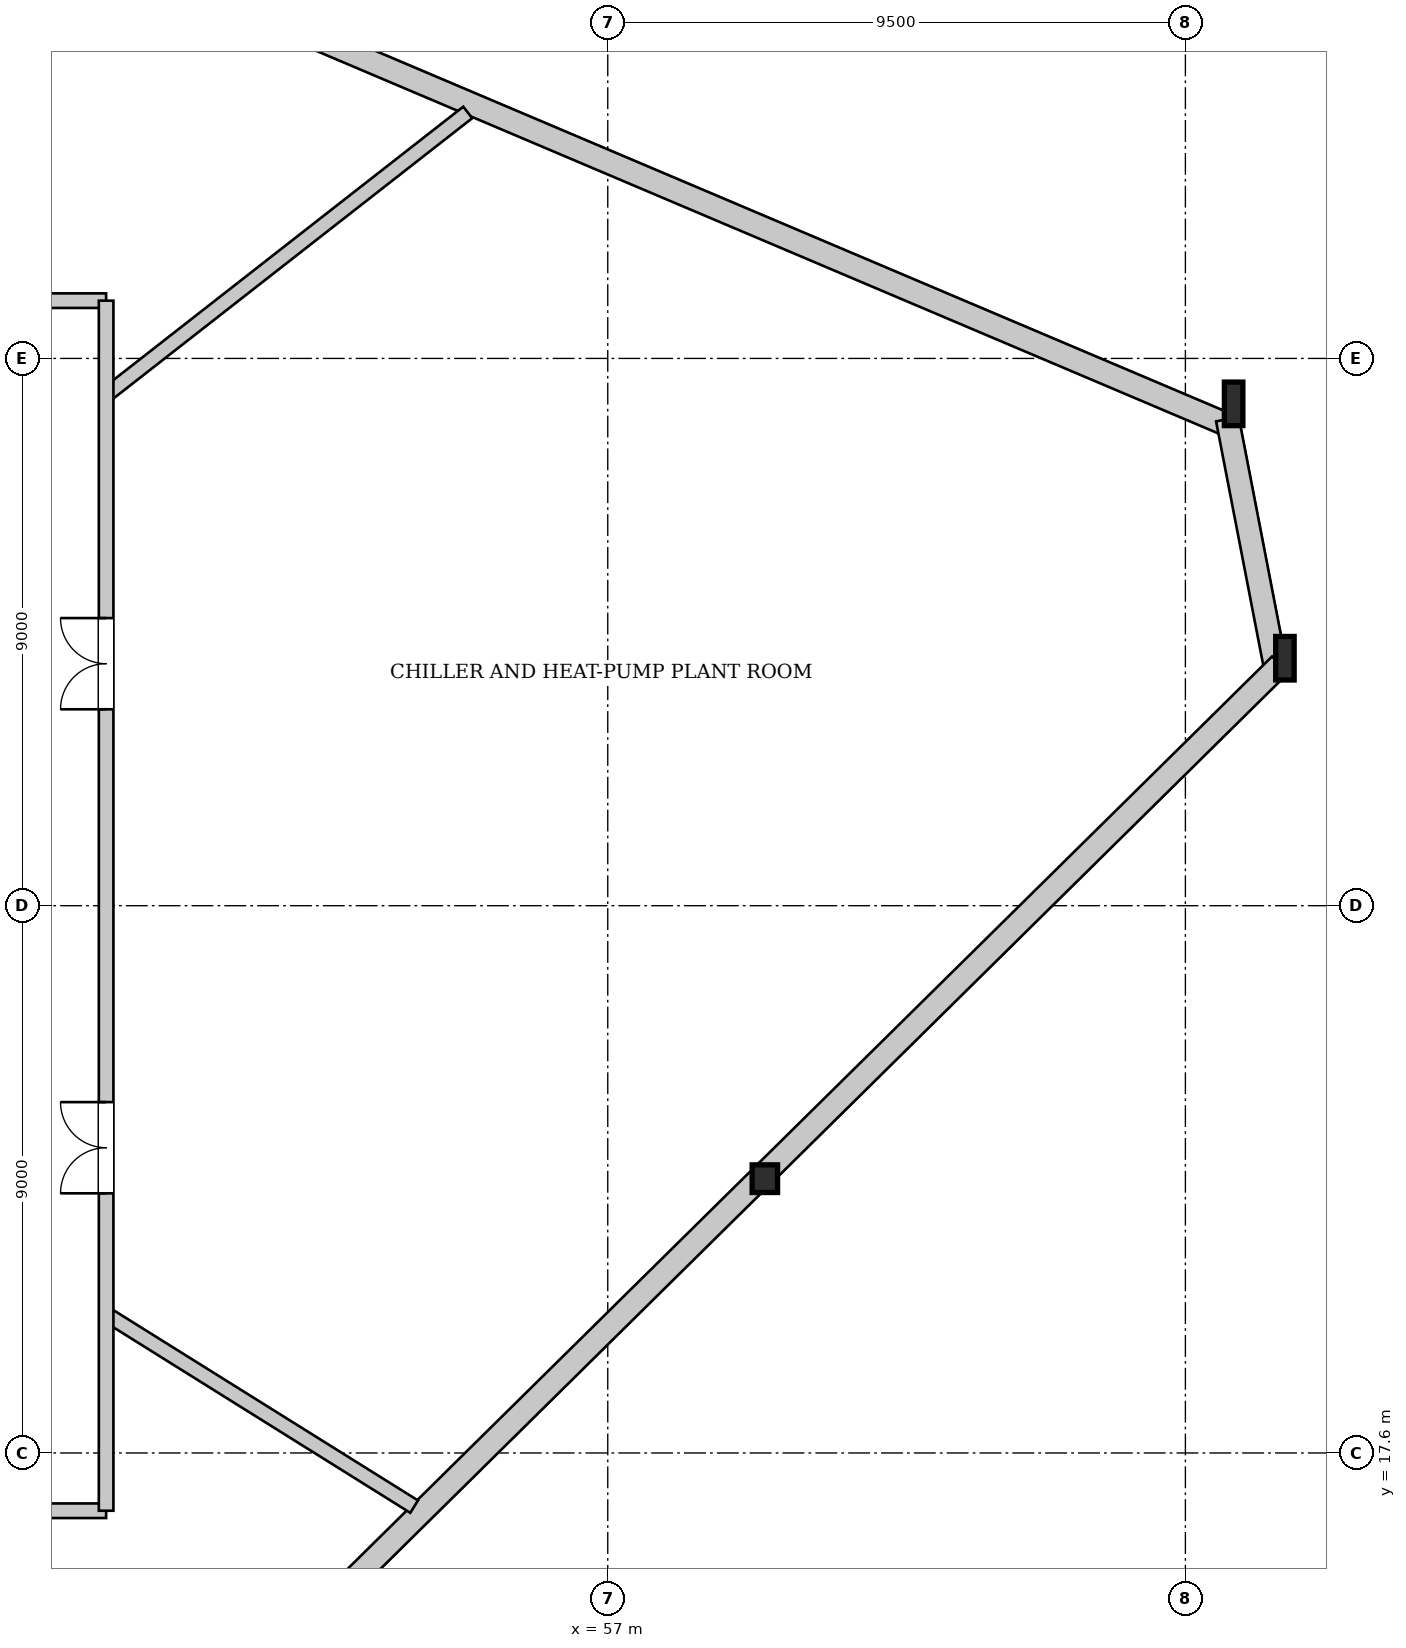
"""IFC4 building model, lengths in metres.
Left out: names, types, materials, properties, quantities, classifications, styles, units other than length and angle.
Written with IfcOpenShell. Run it as: python <this file> out.ifc"""

import sys

from ifc_helpers import new_model, si_unit, direction, frame, frame_2d, origin, origin_2d, place, context, subcontext, project, spatial, rectangle, i_section, extrude, source, transform, mapped, element, fill, save


model = new_model("IFC4")
c1 = context("Model", 3, precision=1e-05, world=origin(), true_north=direction((0.0, 1.0)))
c2 = subcontext(c1, "Body", "Model", "MODEL_VIEW")
j1 = project(units=[si_unit("LENGTHUNIT", "METRE"), si_unit("PLANEANGLEUNIT", "RADIAN")], contexts=[c1])
p1 = place(None, origin())
s1 = spatial("IfcSite", under=j1, at=p1, CompositionType="ELEMENT")
p2 = place(p1, origin())
s2 = spatial("IfcBuilding", under=s1, at=p2, CompositionType="ELEMENT")
p3 = place(p2, frame((0.0, 0.0, 79.9)))
s3 = spatial("IfcBuildingStorey", under=s2, at=p3, CompositionType="ELEMENT", Elevation=79.9)
m1 = source(origin(), c2, "Body", "SweptSolid", [
    extrude(i_section(OverallWidth=0.304, OverallDepth=0.716, WebThickness=0.021, FlangeThickness=0.04, at=origin_2d()), origin(), (0.0, 0.0, 1.0), 4.364),
])
p4 = place(p3, frame((68.192, 30.428, 0.0), z_axis=(-0.025401861911, 0.110727499385, 0.993526127634), x_axis=(-0.974680909031, -0.223600370238, 0.0)))
e1 = element("IfcColumn", 1, at=p4, inside=s3, PredefinedType="COLUMN", context=c2, shape_type="MappedRepresentation", body=[
    mapped(m1, transform((0.0, 0.0, 0.0), x_axis=(1.0, 0.0, 0.0), y_axis=(0.0, 1.0, 0.0), z_axis=(0.0, 0.0, 1.0), scale=1.0)),
])
m2 = source(origin(), c2, "Body", "SweptSolid", [
    extrude(i_section(OverallWidth=0.304, OverallDepth=0.716, WebThickness=0.021, FlangeThickness=0.04, at=origin_2d()), origin(), (0.0, 0.0, 1.0), 4.36),
])
p5 = place(p3, frame((67.378, 34.637, 0.0), z_axis=(-0.038749250033, 0.099112966125, 0.994321434732), x_axis=(-0.93135142614, -0.364121574514, 0.0)))
e2 = element("IfcColumn", 2, at=p5, inside=s3, PredefinedType="COLUMN", context=c2, shape_type="MappedRepresentation", body=[
    mapped(m2, transform((0.0, 0.0, 0.0), x_axis=(1.0, 0.0, 0.0), y_axis=(0.0, 1.0, 0.0), z_axis=(0.0, 0.0, 1.0), scale=1.0)),
])
m3 = source(origin(), c2, "Body", "SweptSolid", [
    extrude(i_section(OverallWidth=0.418, OverallDepth=0.455, WebThickness=0.038, FlangeThickness=0.059, at=origin_2d()), origin(), (0.0, 0.0, 1.0), 4.352),
])
p6 = place(p3, frame((59.574, 21.923, 0.0), z_axis=(0.004432225668, 0.086512556705, 0.996240901042), x_axis=(-0.998690210407, 0.05116506266, 0.0)))
e3 = element("IfcColumn", 3, at=p6, inside=s3, PredefinedType="COLUMN", context=c2, shape_type="MappedRepresentation", body=[
    mapped(m3, transform((0.0, 0.0, 0.0), x_axis=(1.0, 0.0, 0.0), y_axis=(0.0, 1.0, 0.0), z_axis=(0.0, 0.0, 1.0), scale=1.0)),
])
p7 = place(p3, frame((45.57, 43.679, 0.0), z_axis=(0.0, 0.0, 1.0), x_axis=(0.920635630861, -0.390422892758, 0.0)))
e4 = element("IfcWall", 4, at=p7, inside=s3, PredefinedType="SOLIDWALL", context=c2, shape_type="SweptSolid", body=[
    extrude(rectangle(XDim=23.607, YDim=0.38, at=frame_2d((11.804, 0.0))), origin(), (0.0, 0.0, 1.0), 3.642),
])
p8 = place(p3, frame((67.191, 34.601, 0.0), z_axis=(0.0, 0.0, 1.0), x_axis=(0.189990031934, -0.981786019337, 0.0)))
e5 = element("IfcWall", 5, at=p8, inside=s3, PredefinedType="SOLIDWALL", context=c2, shape_type="SweptSolid", body=[
    extrude(rectangle(XDim=4.287, YDim=0.38, at=frame_2d((2.144, 0.0))), origin(), (0.0, 0.0, 1.0), 3.642),
])
p9 = place(p3, frame((68.059, 30.563, 0.0), z_axis=(0.0, 0.0, 1.0), x_axis=(-0.711738982303, -0.70244403412, 0.0)))
e6 = element("IfcWall", 6, at=p9, inside=s3, PredefinedType="SOLIDWALL", context=c2, shape_type="SweptSolid", body=[
    extrude(rectangle(XDim=24.217, YDim=0.38, at=frame_2d((12.109, 0.0))), origin(), (0.0, 0.0, 1.0), 3.642),
])
p10 = place(p3, frame((48.75, 19.883, 0.0), z_axis=(0.0, 0.0, 1.0), x_axis=(0.848037336034, -0.529936483639, 0.0)))
e7 = element("IfcWall", 7, at=p10, inside=s3, PredefinedType="PARTITIONING", context=c2, shape_type="SweptSolid", body=[
    extrude(rectangle(XDim=5.973, YDim=0.24, at=frame_2d((2.987, 0.0))), origin(), (0.0, 0.0, 1.0), 4.25),
])
p11 = place(p3, frame((48.75, 34.999, 0.0), z_axis=(0.0, 0.0, 1.0), x_axis=(0.788016035998, 0.615654714113, 0.0)))
e8 = element("IfcWall", 8, at=p11, inside=s3, PredefinedType="PARTITIONING", context=c2, shape_type="SweptSolid", body=[
    extrude(rectangle(XDim=7.547, YDim=0.24, at=frame_2d((3.773, 0.0))), origin(), (0.0, 0.0, 1.0), 4.25),
])
p12 = place(p3, frame((27.25, 16.65, 0.0), z_axis=(0.0, 0.0, 1.0), x_axis=(1.0, 0.0, 0.0)))
e9 = element("IfcWall", 9, at=p12, inside=s3, PredefinedType="PARTITIONING", context=c2, shape_type="SweptSolid", body=[
    extrude(rectangle(XDim=21.5, YDim=0.24, at=frame_2d((10.75, 0.0))), origin(), (0.0, 0.0, 1.0), 4.25),
])
p13 = place(p12, frame((5.79, 0.0, 0.0)))
e10 = element("IfcOpeningElement", 10, at=p13, cuts=e9, PredefinedType="OPENING", context=c2, shape_type="SweptSolid", body=[
    extrude(rectangle(XDim=1.32, YDim=2.2, at=frame_2d((0.66, 1.1))), frame((0.0, 0.13, 0.0), z_axis=(0.0, -1.0, 0.0), x_axis=(1.0, 0.0, 0.0)), (0.0, 0.0, 1.0), 0.26),
])
p14 = place(p12, frame((14.39, 0.0, 0.0)))
e11 = element("IfcOpeningElement", 11, at=p14, cuts=e9, PredefinedType="OPENING", context=c2, shape_type="SweptSolid", body=[
    extrude(rectangle(XDim=1.5, YDim=2.25, at=frame_2d((0.75, 1.125))), frame((0.0, 0.13, 0.0), z_axis=(0.0, -1.0, 0.0), x_axis=(1.0, 0.0, 0.0)), (0.0, 0.0, 1.0), 0.26),
])
p15 = place(p3, frame((27.25, 36.55, 0.0), z_axis=(0.0, 0.0, 1.0), x_axis=(1.0, 0.0, 0.0)))
e12 = element("IfcWall", 12, at=p15, inside=s3, PredefinedType="PARTITIONING", context=c2, shape_type="SweptSolid", body=[
    extrude(rectangle(XDim=21.5, YDim=0.24, at=frame_2d((10.75, 0.0))), origin(), (0.0, 0.0, 1.0), 4.25),
])
p16 = place(p15, frame((4.9, 0.0, 0.0)))
e13 = element("IfcOpeningElement", 13, at=p16, cuts=e12, PredefinedType="OPENING", context=c2, shape_type="SweptSolid", body=[
    extrude(rectangle(XDim=1.5, YDim=2.25, at=frame_2d((0.75, 1.125))), frame((0.0, 0.13, 0.0), z_axis=(0.0, -1.0, 0.0), x_axis=(1.0, 0.0, 0.0)), (0.0, 0.0, 1.0), 0.26),
])
p17 = place(p15, frame((14.3, 0.0, 0.0)))
e14 = element("IfcOpeningElement", 14, at=p17, cuts=e12, PredefinedType="OPENING", context=c2, shape_type="SweptSolid", body=[
    extrude(rectangle(XDim=1.5, YDim=2.25, at=frame_2d((0.75, 1.125))), frame((0.0, 0.13, 0.0), z_axis=(0.0, -1.0, 0.0), x_axis=(1.0, 0.0, 0.0)), (0.0, 0.0, 1.0), 0.26),
])
p18 = place(p3, frame((48.75, 16.65, 0.0), z_axis=(0.0, 0.0, 1.0), x_axis=(0.0, 1.0, 0.0)))
e15 = element("IfcWall", 15, at=p18, inside=s3, PredefinedType="PARTITIONING", context=c2, shape_type="SweptSolid", body=[
    extrude(rectangle(XDim=19.9, YDim=0.24, at=frame_2d((9.95, 0.0))), origin(), (0.0, 0.0, 1.0), 4.25),
])
p19 = place(p18, frame((5.22, 0.0, 0.0)))
e16 = element("IfcOpeningElement", 16, at=p19, cuts=e15, PredefinedType="OPENING", context=c2, shape_type="SweptSolid", body=[
    extrude(rectangle(XDim=1.5, YDim=2.25, at=frame_2d((0.75, 1.125))), frame((0.0, 0.13, 0.0), z_axis=(0.0, -1.0, 0.0), x_axis=(1.0, 0.0, 0.0)), (0.0, 0.0, 1.0), 0.26),
])
p20 = place(p18, frame((13.18, 0.0, 0.0)))
e17 = element("IfcOpeningElement", 17, at=p20, cuts=e15, PredefinedType="OPENING", context=c2, shape_type="SweptSolid", body=[
    extrude(rectangle(XDim=1.5, YDim=2.25, at=frame_2d((0.75, 1.125))), frame((0.0, 0.13, 0.0), z_axis=(0.0, -1.0, 0.0), x_axis=(1.0, 0.0, 0.0)), (0.0, 0.0, 1.0), 0.26),
])
m4 = source(origin(), c2, "Body", "SweptSolid", [
    extrude(rectangle(XDim=1.5, YDim=2.25, at=frame_2d((0.75, 1.125))), frame((0.0, 0.025, 0.0), z_axis=(0.0, -1.0, 0.0), x_axis=(1.0, 0.0, 0.0)), (0.0, 0.0, 1.0), 0.05),
])
p21 = place(p19, origin())
e18 = element("IfcDoor", 18, at=p21, inside=s3, OperationType="DOUBLE_DOOR_SINGLE_SWING", PredefinedType="DOOR", context=c2, shape_type="MappedRepresentation", body=[
    mapped(m4, transform((0.0, 0.0, 0.0), x_axis=(1.0, 0.0, 0.0), y_axis=(0.0, 1.0, 0.0), z_axis=(0.0, 0.0, 1.0), scale=1.0)),
])
fill(e16, e18)
p22 = place(p20, origin())
e19 = element("IfcDoor", 19, at=p22, inside=s3, OperationType="DOUBLE_DOOR_SINGLE_SWING", PredefinedType="DOOR", context=c2, shape_type="MappedRepresentation", body=[
    mapped(m4, transform((0.0, 0.0, 0.0), x_axis=(1.0, 0.0, 0.0), y_axis=(0.0, 1.0, 0.0), z_axis=(0.0, 0.0, 1.0), scale=1.0)),
])
fill(e17, e19)
save(model, sys.argv[1])
